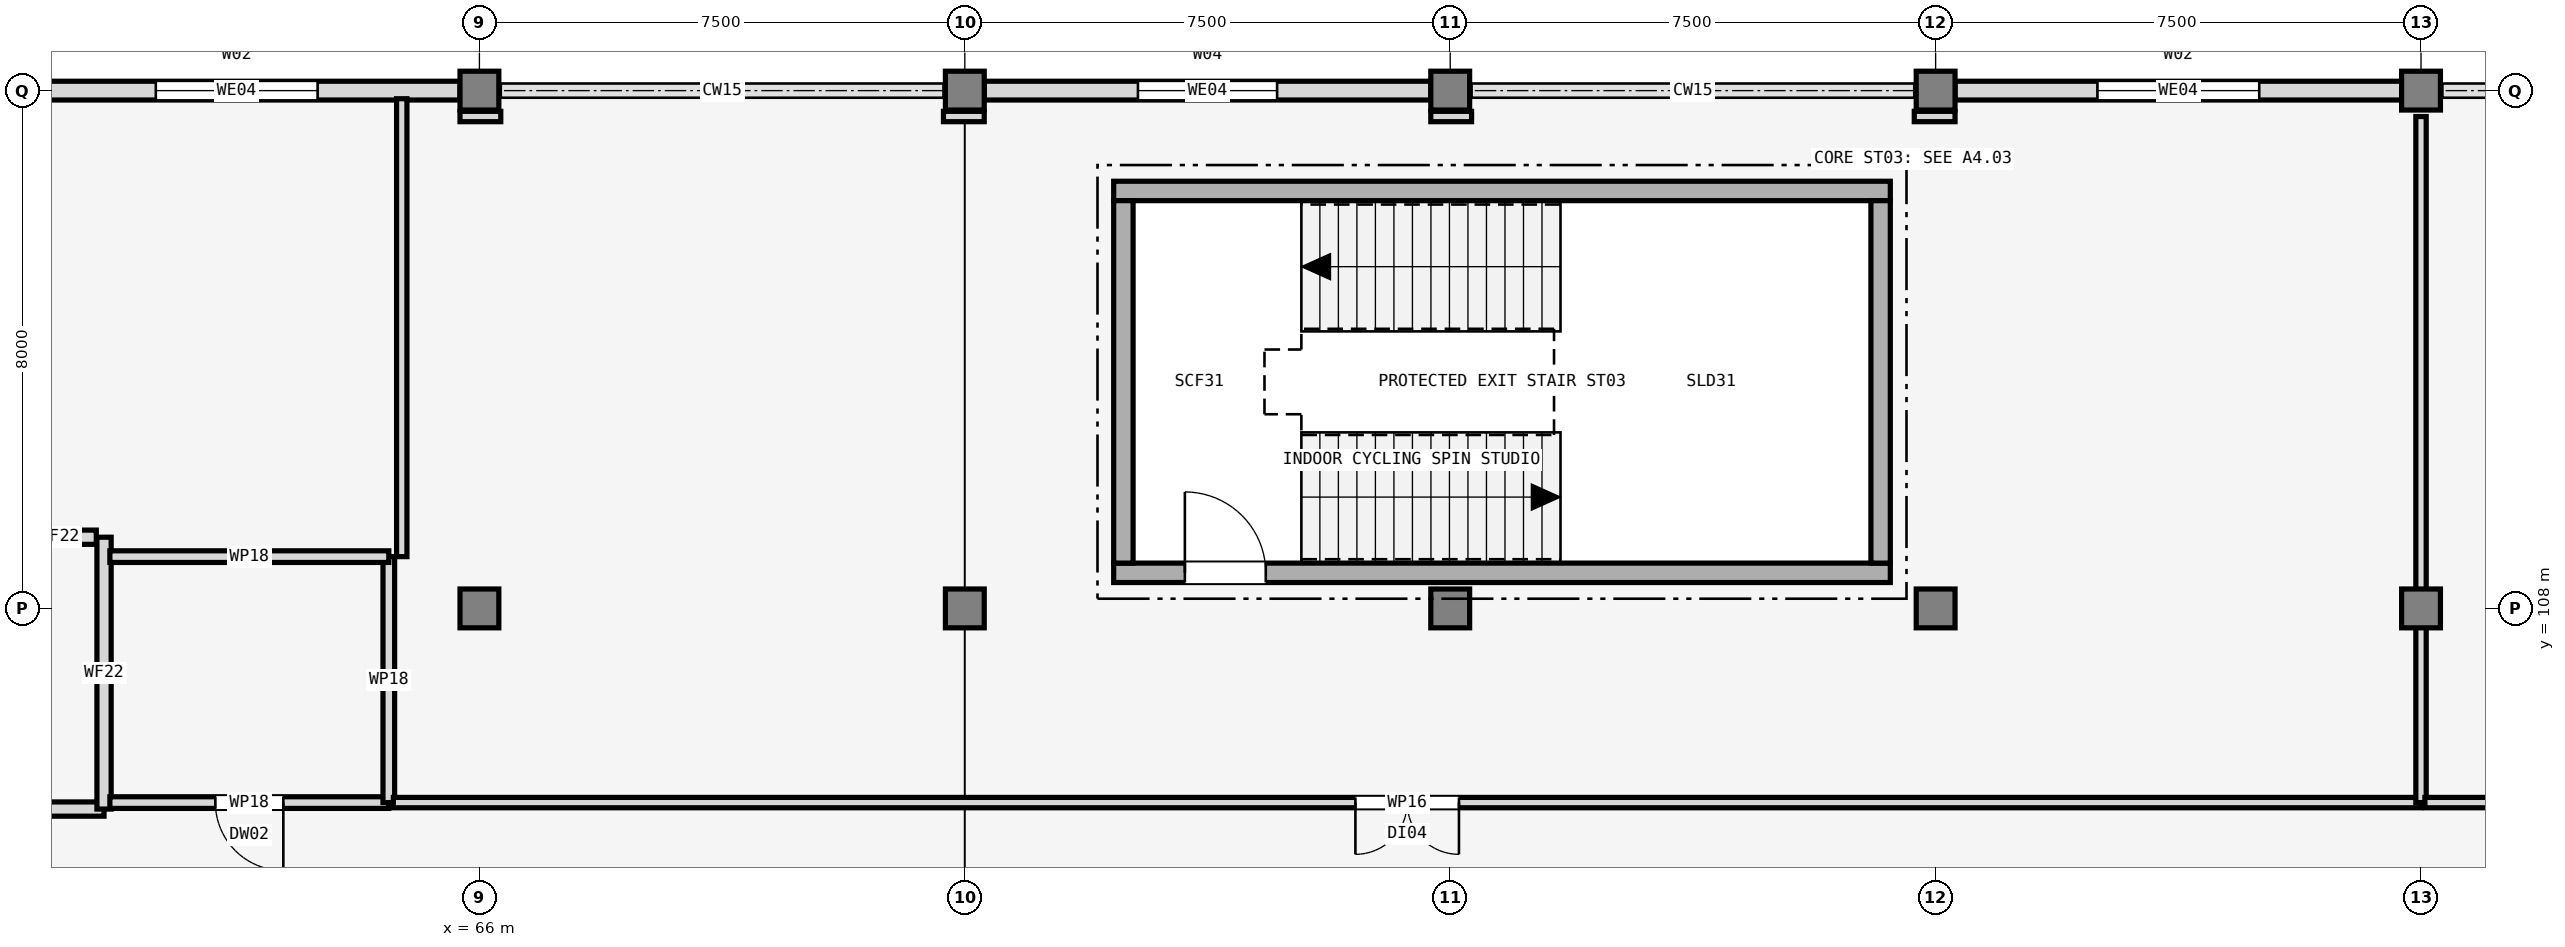
"""IFC4 building model, lengths in metres.
Left out: names, types, materials, properties, quantities, classifications, styles, units other than length and angle.
Written with IfcOpenShell. Run it as: python <this file> out.ifc"""

import sys

from ifc_helpers import new_model, si_unit, direction, frame, frame_2d, origin, origin_2d, place, context, subcontext, project, spatial, rectangle, extrude, element, fill, save


model = new_model("IFC4")
c1 = context("Model", 3, precision=1e-05, world=origin(), true_north=direction((0.0, 1.0)))
c2 = subcontext(c1, "Body", "Model", "MODEL_VIEW")
j1 = project(units=[si_unit("LENGTHUNIT", "METRE"), si_unit("PLANEANGLEUNIT", "RADIAN")], contexts=[c1])
p1 = place(None, origin())
s1 = spatial("IfcSite", under=j1, at=p1, CompositionType="ELEMENT")
p2 = place(p1, origin())
s2 = spatial("IfcBuilding", under=s1, at=p2, CompositionType="ELEMENT")
p3 = place(p2, frame((0.0, 0.0, 4.8)))
s3 = spatial("IfcBuildingStorey", under=s2, at=p3, CompositionType="ELEMENT", Elevation=4.8)
for number, where, z_axis, x_axis in (
    (1, (66.0, 108.0, 0.0), (0.0, 0.0, 1.0), (1.0, 0.0, 0.0)),
    (2, (66.0, 116.0, 0.0), (0.0, 0.0, 1.0), (1.0, 0.0, 0.0)),
    (3, (73.5, 108.0, 0.0), (0.0, 0.0, 1.0), (1.0, 0.0, 0.0)),
    (4, (73.5, 116.0, 0.0), (0.0, 0.0, 1.0), (1.0, 0.0, 0.0)),
    (5, (81.0, 108.0, 0.0), (0.0, 0.0, 1.0), (1.0, 0.0, 0.0)),
    (6, (81.0, 116.0, 0.0), (0.0, 0.0, 1.0), (1.0, 0.0, 0.0)),
    (7, (88.5, 108.0, 0.0), (0.0, 0.0, 1.0), (1.0, 0.0, 0.0)),
    (8, (88.5, 116.0, 0.0), (0.0, 0.0, 1.0), (1.0, 0.0, 0.0)),
    (9, (96.0, 108.0, 0.0), (0.0, 0.0, 1.0), (1.0, 0.0, 0.0)),
    (10, (96.0, 116.0, 0.0), (0.0, 0.0, 1.0), (1.0, 0.0, 0.0)),
):
    element("IfcColumn", number, at=place(p3, frame(where, z_axis=z_axis, x_axis=x_axis)), inside=s3, PredefinedType="COLUMN", context=c2, shape_type="SweptSolid", body=[
        extrude(rectangle(XDim=0.6, YDim=0.6, at=origin_2d()), origin(), (0.0, 0.0, 1.0), 4.5),
    ])
p4 = place(p3, frame((65.7, 116.0, 0.0), z_axis=(0.0, 0.0, 1.0), x_axis=(-1.0, 0.0, 0.0)))
e11 = element("IfcWall", 11, at=p4, inside=s3, PredefinedType="SOLIDWALL", context=c2, shape_type="SweptSolid", body=[
    extrude(rectangle(XDim=6.9, YDim=0.29, at=frame_2d((3.45, 0.0))), origin(), (0.0, 0.0, 1.0), 3.7),
])
p5 = place(p4, frame((2.2, 0.0, 0.95)))
e12 = element("IfcOpeningElement", 12, at=p5, cuts=e11, PredefinedType="OPENING", context=c2, shape_type="SweptSolid", body=[
    extrude(rectangle(XDim=2.5, YDim=1.8, at=frame_2d((1.25, 0.9))), frame((0.0, 0.155, 0.0), z_axis=(0.0, -1.0, 0.0), x_axis=(1.0, 0.0, 0.0)), (0.0, 0.0, 1.0), 0.31),
])
p6 = place(p3, frame((80.7, 116.0, 0.0), z_axis=(0.0, 0.0, 1.0), x_axis=(-1.0, 0.0, 0.0)))
e13 = element("IfcWall", 13, at=p6, inside=s3, PredefinedType="SOLIDWALL", context=c2, shape_type="SweptSolid", body=[
    extrude(rectangle(XDim=6.9, YDim=0.29, at=frame_2d((3.45, 0.0))), origin(), (0.0, 0.0, 1.0), 3.7),
])
p7 = place(p6, frame((2.375, 0.0, 0.95)))
e14 = element("IfcOpeningElement", 14, at=p7, cuts=e13, PredefinedType="OPENING", context=c2, shape_type="SweptSolid", body=[
    extrude(rectangle(XDim=2.15, YDim=1.7, at=frame_2d((1.075, 0.85))), frame((0.0, 0.155, 0.0), z_axis=(0.0, -1.0, 0.0), x_axis=(1.0, 0.0, 0.0)), (0.0, 0.0, 1.0), 0.31),
])
p8 = place(p3, frame((95.7, 116.0, 0.0), z_axis=(0.0, 0.0, 1.0), x_axis=(-1.0, 0.0, 0.0)))
e15 = element("IfcWall", 15, at=p8, inside=s3, PredefinedType="SOLIDWALL", context=c2, shape_type="SweptSolid", body=[
    extrude(rectangle(XDim=6.9, YDim=0.29, at=frame_2d((3.45, 0.0))), origin(), (0.0, 0.0, 1.0), 3.7),
])
p9 = place(p8, frame((2.2, 0.0, 0.95)))
e16 = element("IfcOpeningElement", 16, at=p9, cuts=e15, PredefinedType="OPENING", context=c2, shape_type="SweptSolid", body=[
    extrude(rectangle(XDim=2.5, YDim=1.8, at=frame_2d((1.25, 0.9))), frame((0.0, 0.155, 0.0), z_axis=(0.0, -1.0, 0.0), x_axis=(1.0, 0.0, 0.0)), (0.0, 0.0, 1.0), 0.31),
])
p10 = place(p3, frame((75.8, 108.55, 0.0), z_axis=(0.0, 0.0, 1.0), x_axis=(1.0, 0.0, 0.0)))
e17 = element("IfcWall", 17, at=p10, inside=s3, PredefinedType="SHEAR", context=c2, shape_type="SweptSolid", body=[
    extrude(rectangle(XDim=12.0, YDim=0.3, at=frame_2d((6.0, 0.0))), origin(), (0.0, 0.0, 1.0), 4.5),
])
p11 = place(p10, frame((1.1, 0.0, 0.0)))
e18 = element("IfcOpeningElement", 18, at=p11, cuts=e17, PredefinedType="OPENING", context=c2, shape_type="SweptSolid", body=[
    extrude(rectangle(XDim=1.25, YDim=2.15, at=frame_2d((0.625, 1.075))), frame((0.0, 0.16, 0.0), z_axis=(0.0, -1.0, 0.0), x_axis=(1.0, 0.0, 0.0)), (0.0, 0.0, 1.0), 0.32),
])
p12 = place(p3, frame((87.8, 114.45, 0.0), z_axis=(0.0, 0.0, 1.0), x_axis=(-1.0, 0.0, 0.0)))
e19 = element("IfcWall", 19, at=p12, inside=s3, PredefinedType="SHEAR", context=c2, shape_type="SweptSolid", body=[
    extrude(rectangle(XDim=12.0, YDim=0.3, at=frame_2d((6.0, 0.0))), origin(), (0.0, 0.0, 1.0), 4.5),
])
for number, where, z_axis, x_axis in (
    (20, (75.95, 114.3, 0.0), (0.0, 0.0, 1.0), (0.0, -1.0, 0.0)),
    (21, (87.65, 108.7, 0.0), (0.0, 0.0, 1.0), (0.0, 1.0, 0.0)),
):
    element("IfcWall", number, at=place(p3, frame(where, z_axis=z_axis, x_axis=x_axis)), inside=s3, PredefinedType="SHEAR", context=c2, shape_type="SweptSolid", body=[
        extrude(rectangle(XDim=5.6, YDim=0.3, at=frame_2d((2.8, 0.0))), origin(), (0.0, 0.0, 1.0), 4.5),
    ])
p13 = place(p3, frame((55.92, 104.9, 0.0), z_axis=(0.0, 0.0, 1.0), x_axis=(1.0, 0.0, 0.0)))
e22 = element("IfcWall", 22, at=p13, inside=s3, PredefinedType="SOLIDWALL", context=c2, shape_type="SweptSolid", body=[
    extrude(rectangle(XDim=4.28, YDim=0.22, at=frame_2d((2.14, 0.0))), origin(), (0.0, 0.0, 1.0), 3.4),
])
p14 = place(p13, frame((1.24, 0.0, 0.0)))
e23 = element("IfcOpeningElement", 23, at=p14, cuts=e22, PredefinedType="OPENING", context=c2, shape_type="SweptSolid", body=[
    extrude(rectangle(XDim=1.8, YDim=2.2, at=frame_2d((0.9, 1.1))), frame((0.0, 0.12, 0.0), z_axis=(0.0, -1.0, 0.0), x_axis=(1.0, 0.0, 0.0)), (0.0, 0.0, 1.0), 0.24),
])
p15 = place(p3, frame((60.2, 104.9, 0.0), z_axis=(0.0, 0.0, 1.0), x_axis=(0.0, 1.0, 0.0)))
e24 = element("IfcWall", 24, at=p15, inside=s3, PredefinedType="SOLIDWALL", context=c2, shape_type="SweptSolid", body=[
    extrude(rectangle(XDim=4.2, YDim=0.22, at=frame_2d((2.1, 0.0))), origin(), (0.0, 0.0, 1.0), 3.4),
])
p16 = place(p3, frame((58.95, 109.1, 0.0), z_axis=(0.0, 0.0, 1.0), x_axis=(1.0, 0.0, 0.0)))
e25 = element("IfcWall", 25, at=p16, inside=s3, PredefinedType="SOLIDWALL", context=c2, shape_type="SweptSolid", body=[
    extrude(rectangle(XDim=1.13, YDim=0.22, at=frame_2d((0.565, 0.0))), origin(), (0.0, 0.0, 1.0), 3.4),
])
p17 = place(p3, frame((64.6, 105.0, 0.0), z_axis=(0.0, 0.0, 1.0), x_axis=(-1.0, 0.0, 0.0)))
e26 = element("IfcWall", 26, at=p17, inside=s3, PredefinedType="PARTITIONING", context=c2, shape_type="SweptSolid", body=[
    extrude(rectangle(XDim=4.31, YDim=0.18, at=frame_2d((2.155, 0.0))), origin(), (0.0, 0.0, 1.0), 3.4),
])
p18 = place(p17, frame((1.63, 0.0, 0.0)))
e27 = element("IfcOpeningElement", 27, at=p18, cuts=e26, PredefinedType="OPENING", context=c2, shape_type="SweptSolid", body=[
    extrude(rectangle(XDim=1.05, YDim=2.1, at=frame_2d((0.525, 1.05))), frame((0.0, 0.1, 0.0), z_axis=(0.0, -1.0, 0.0), x_axis=(1.0, 0.0, 0.0)), (0.0, 0.0, 1.0), 0.2),
])
p19 = place(p3, frame((64.6, 108.8, 0.0), z_axis=(0.0, 0.0, 1.0), x_axis=(0.0, -1.0, 0.0)))
e28 = element("IfcWall", 28, at=p19, inside=s3, PredefinedType="PARTITIONING", context=c2, shape_type="SweptSolid", body=[
    extrude(rectangle(XDim=3.8, YDim=0.18, at=frame_2d((1.9, 0.0))), origin(), (0.0, 0.0, 1.0), 3.4),
])
p20 = place(p3, frame((60.29, 108.8, 0.0), z_axis=(0.0, 0.0, 1.0), x_axis=(1.0, 0.0, 0.0)))
e29 = element("IfcWall", 29, at=p20, inside=s3, PredefinedType="PARTITIONING", context=c2, shape_type="SweptSolid", body=[
    extrude(rectangle(XDim=4.31, YDim=0.18, at=frame_2d((2.155, 0.0))), origin(), (0.0, 0.0, 1.0), 3.4),
])
p21 = place(p3, frame((96.0, 105.0, 0.0), z_axis=(0.0, 0.0, 1.0), x_axis=(-1.0, 0.0, 0.0)))
e30 = element("IfcWall", 30, at=p21, inside=s3, PredefinedType="PARTITIONING", context=c2, shape_type="SweptSolid", body=[
    extrude(rectangle(XDim=31.33, YDim=0.16, at=frame_2d((15.665, 0.0))), origin(), (0.0, 0.0, 1.0), 3.4),
])
p22 = place(p21, frame((14.865, 0.0, 0.0)))
e31 = element("IfcOpeningElement", 31, at=p22, cuts=e30, PredefinedType="OPENING", context=c2, shape_type="SweptSolid", body=[
    extrude(rectangle(XDim=1.6, YDim=2.2, at=frame_2d((0.8, 1.1))), frame((0.0, 0.09, 0.0), z_axis=(0.0, -1.0, 0.0), x_axis=(1.0, 0.0, 0.0)), (0.0, 0.0, 1.0), 0.18),
])
p23 = place(p3, frame((96.0, 115.6, 0.0), z_axis=(0.0, 0.0, 1.0), x_axis=(0.0, -1.0, 0.0)))
e32 = element("IfcWall", 32, at=p23, inside=s3, PredefinedType="PARTITIONING", context=c2, shape_type="SweptSolid", body=[
    extrude(rectangle(XDim=10.6, YDim=0.16, at=frame_2d((5.3, 0.0))), origin(), (0.0, 0.0, 1.0), 3.4),
])
p24 = place(p3, frame((64.8, 108.8, 0.0), z_axis=(0.0, 0.0, 1.0), x_axis=(0.0, 1.0, 0.0)))
e33 = element("IfcWall", 33, at=p24, inside=s3, PredefinedType="PARTITIONING", context=c2, shape_type="SweptSolid", body=[
    extrude(rectangle(XDim=7.075, YDim=0.16, at=frame_2d((3.538, 0.0))), origin(), (0.0, 0.0, 1.0), 3.4),
])
for number, where, z_axis, x_axis in (
    (34, (65.7, 115.6, 0.0), (0.0, 0.0, 1.0), (1.0, 0.0, 0.0)),
    (35, (73.17, 115.6, 0.0), (0.0, 0.0, 1.0), (1.0, 0.0, 0.0)),
    (36, (80.7, 115.6, 0.0), (0.0, 0.0, 1.0), (1.0, 0.0, 0.0)),
    (37, (88.17, 115.6, 0.0), (0.0, 0.0, 1.0), (1.0, 0.0, 0.0)),
):
    element("IfcWall", number, at=place(p3, frame(where, z_axis=z_axis, x_axis=x_axis)), inside=s3, PredefinedType="PARTITIONING", context=c2, shape_type="SweptSolid", body=[
        extrude(rectangle(XDim=0.63, YDim=0.16, at=frame_2d((0.315, 0.0))), origin(), (0.0, 0.0, 1.0), 3.4),
    ])
p25 = place(p3, frame((133.375, 105.0, 0.0), z_axis=(0.0, 0.0, 1.0), x_axis=(-1.0, 0.0, 0.0)))
e38 = element("IfcWall", 38, at=p25, inside=s3, PredefinedType="PARTITIONING", context=c2, shape_type="SweptSolid", body=[
    extrude(rectangle(XDim=37.315, YDim=0.16, at=frame_2d((18.657, 0.0))), origin(), (0.0, 0.0, 1.0), 3.4),
])
p26 = place(p25, frame((21.157, 0.0, 0.0)))
e39 = element("IfcOpeningElement", 39, at=p26, cuts=e38, PredefinedType="OPENING", context=c2, shape_type="SweptSolid", body=[
    extrude(rectangle(XDim=1.6, YDim=2.2, at=frame_2d((0.8, 1.1))), frame((0.0, 0.09, 0.0), z_axis=(0.0, -1.0, 0.0), x_axis=(1.0, 0.0, 0.0)), (0.0, 0.0, 1.0), 0.18),
])
p27 = place(p5, origin())
e40 = element("IfcWindow", 40, at=p27, inside=s3, PartitioningType="SINGLE_PANEL", PredefinedType="WINDOW", context=c2, shape_type="SweptSolid", body=[
    extrude(rectangle(XDim=2.5, YDim=1.8, at=frame_2d((1.25, 0.9))), frame((0.0, 0.03, 0.0), z_axis=(0.0, -1.0, 0.0), x_axis=(1.0, 0.0, 0.0)), (0.0, 0.0, 1.0), 0.06),
])
fill(e12, e40)
p28 = place(p7, origin())
e41 = element("IfcWindow", 41, at=p28, inside=s3, PartitioningType="SINGLE_PANEL", PredefinedType="WINDOW", context=c2, shape_type="SweptSolid", body=[
    extrude(rectangle(XDim=2.15, YDim=1.7, at=frame_2d((1.075, 0.85))), frame((0.0, 0.03, 0.0), z_axis=(0.0, -1.0, 0.0), x_axis=(1.0, 0.0, 0.0)), (0.0, 0.0, 1.0), 0.06),
])
fill(e14, e41)
p29 = place(p9, origin())
e42 = element("IfcWindow", 42, at=p29, inside=s3, PartitioningType="SINGLE_PANEL", PredefinedType="WINDOW", context=c2, shape_type="SweptSolid", body=[
    extrude(rectangle(XDim=2.5, YDim=1.8, at=frame_2d((1.25, 0.9))), frame((0.0, 0.03, 0.0), z_axis=(0.0, -1.0, 0.0), x_axis=(1.0, 0.0, 0.0)), (0.0, 0.0, 1.0), 0.06),
])
fill(e16, e42)
p30 = place(p11, origin())
e43 = element("IfcDoor", 43, at=p30, inside=s3, OperationType="SINGLE_SWING_LEFT", PredefinedType="DOOR", context=c2, shape_type="SweptSolid", body=[
    extrude(rectangle(XDim=1.25, YDim=2.15, at=frame_2d((0.625, 1.075))), frame((0.0, 0.025, 0.0), z_axis=(0.0, -1.0, 0.0), x_axis=(1.0, 0.0, 0.0)), (0.0, 0.0, 1.0), 0.05),
])
fill(e18, e43)
p31 = place(p18, origin())
e44 = element("IfcDoor", 44, at=p31, inside=s3, OperationType="SINGLE_SWING_LEFT", PredefinedType="DOOR", context=c2, shape_type="SweptSolid", body=[
    extrude(rectangle(XDim=1.05, YDim=2.1, at=frame_2d((0.525, 1.05))), frame((0.0, 0.025, 0.0), z_axis=(0.0, -1.0, 0.0), x_axis=(1.0, 0.0, 0.0)), (0.0, 0.0, 1.0), 0.05),
])
fill(e27, e44)
p32 = place(p22, origin())
e45 = element("IfcDoor", 45, at=p32, inside=s3, OperationType="DOUBLE_DOOR_SINGLE_SWING", PredefinedType="DOOR", context=c2, shape_type="SweptSolid", body=[
    extrude(rectangle(XDim=1.6, YDim=2.2, at=frame_2d((0.8, 1.1))), frame((0.0, 0.025, 0.0), z_axis=(0.0, -1.0, 0.0), x_axis=(1.0, 0.0, 0.0)), (0.0, 0.0, 1.0), 0.05),
])
fill(e31, e45)
save(model, sys.argv[1])
